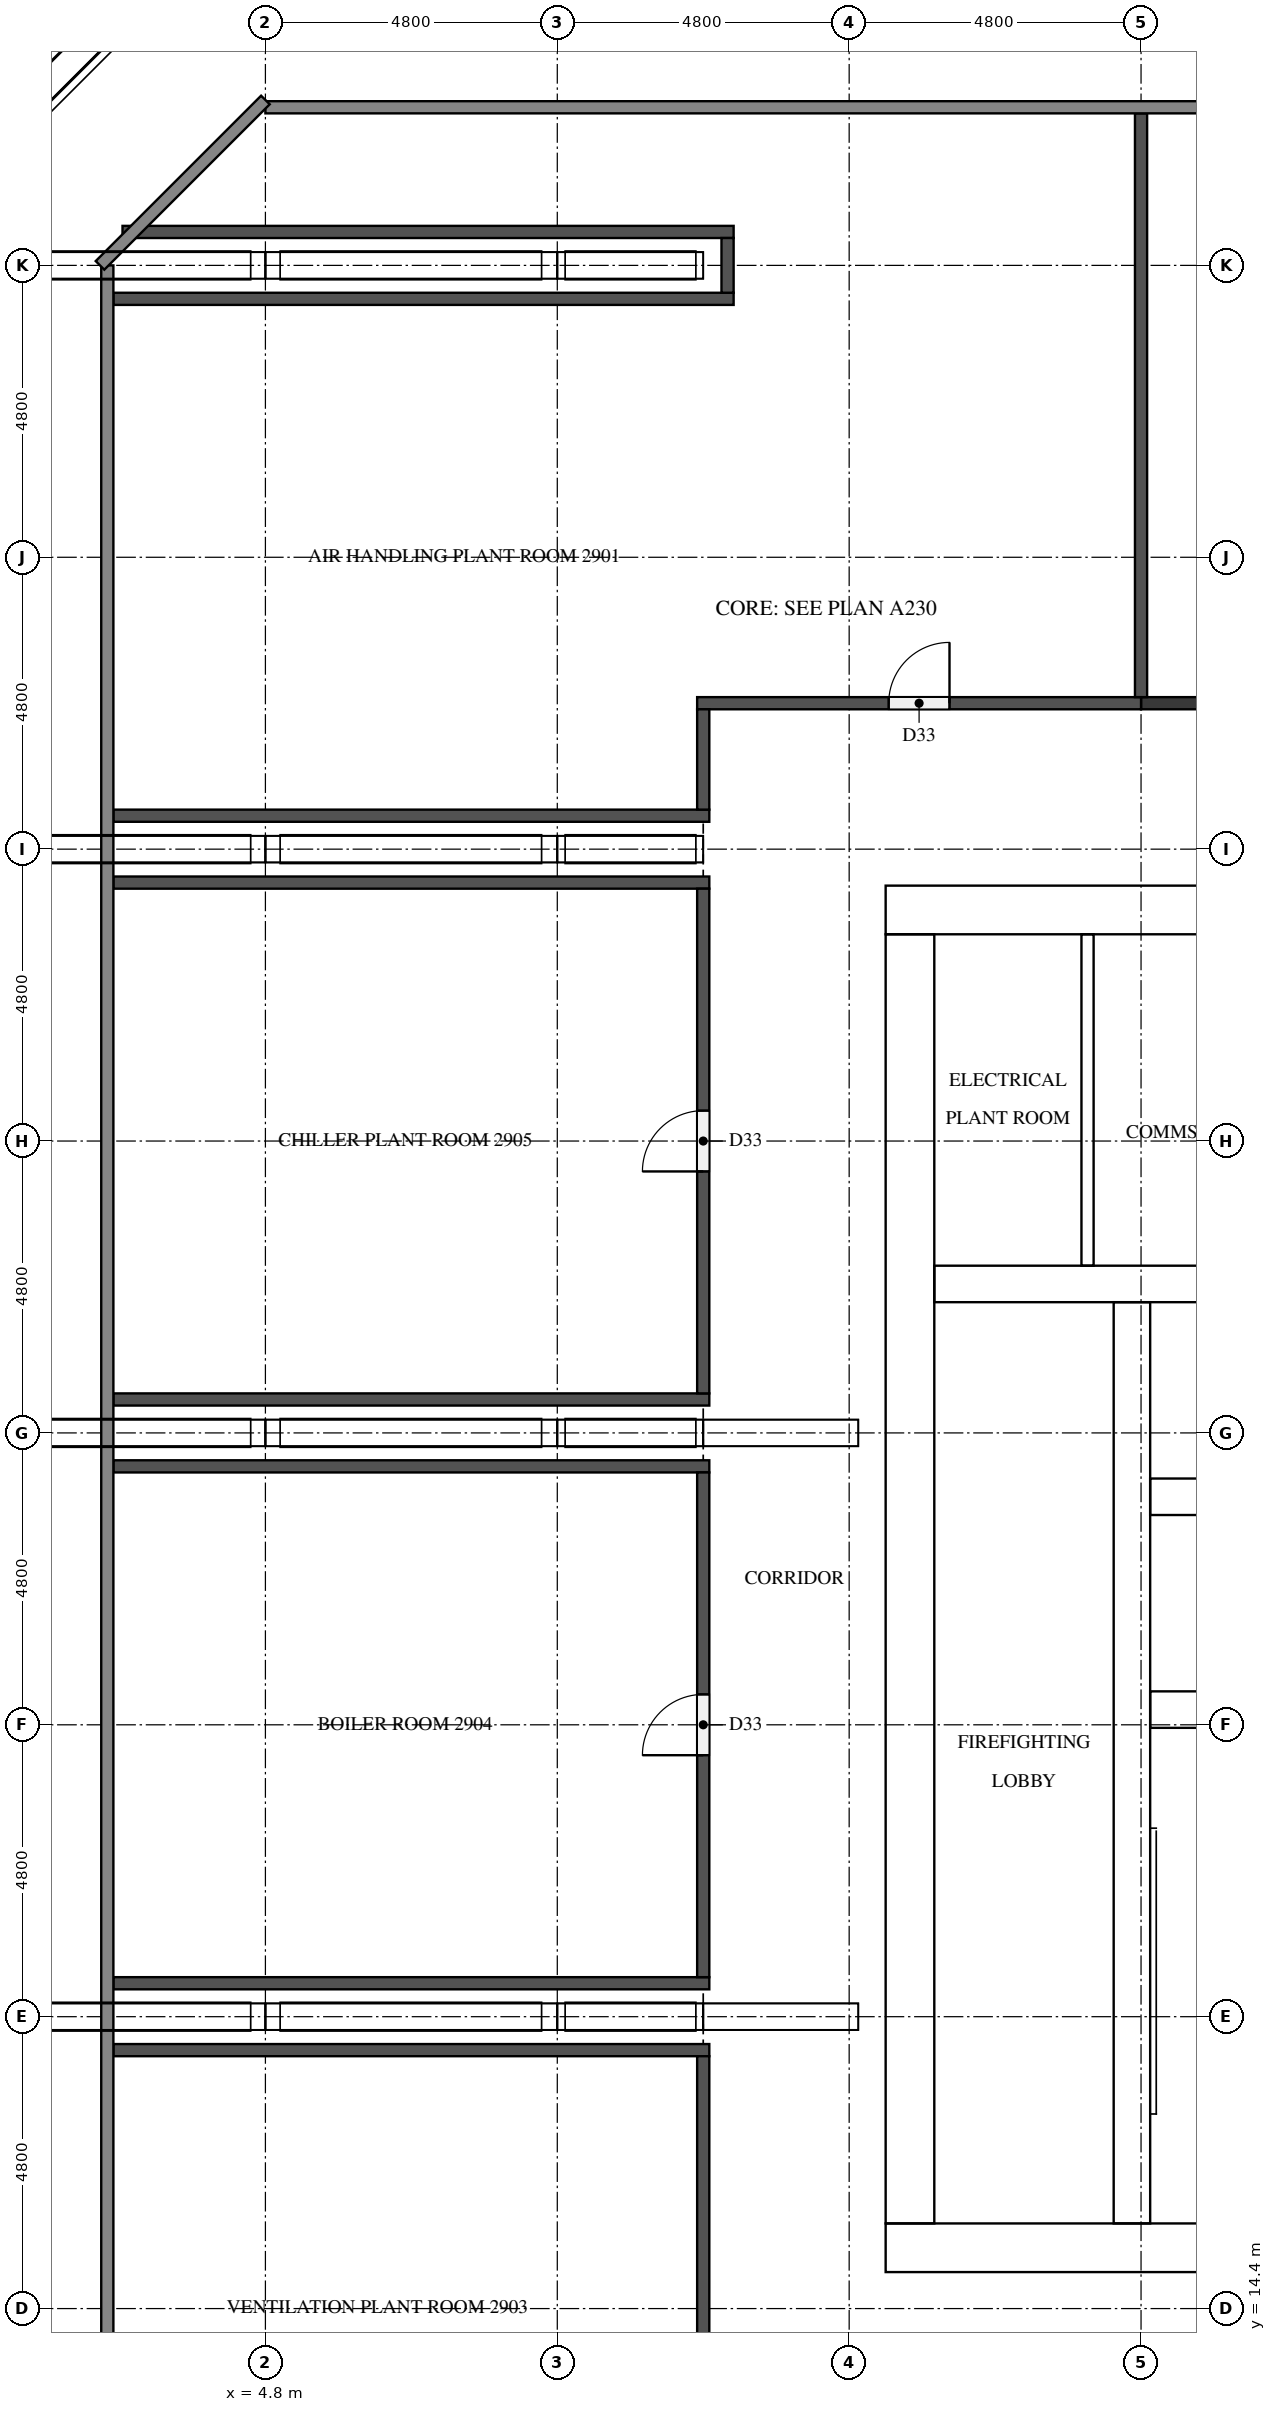
"""IFC4 building model, lengths in metres.
Left out: names, types, materials, properties, quantities, classifications, styles, units other than length and angle.
Written with IfcOpenShell. Run it as: python <this file> out.ifc"""

import sys

from ifc_helpers import new_model, si_unit, direction, frame, frame_2d, origin, place, context, subcontext, project, spatial, rectangle, extrude, element, fill, save


model = new_model("IFC4")
c1 = context("Model", 3, precision=1e-05, world=origin(), true_north=direction((0.0, 1.0)))
c2 = subcontext(c1, "Body", "Model", "MODEL_VIEW")
j1 = project(units=[si_unit("LENGTHUNIT", "METRE"), si_unit("PLANEANGLEUNIT", "RADIAN")], contexts=[c1])
p1 = place(None, origin())
s1 = spatial("IfcSite", under=j1, at=p1, CompositionType="ELEMENT")
p2 = place(p1, origin())
s2 = spatial("IfcBuilding", under=s1, at=p2, CompositionType="ELEMENT")
p3 = place(p2, frame((0.0, 0.0, 113.7)))
s3 = spatial("IfcBuildingStorey", under=s2, at=p3, CompositionType="ELEMENT", Elevation=113.7)
p4 = place(p3, frame((15.0, 15.4, 0.0), z_axis=(0.0, 0.0, 1.0), x_axis=(1.0, 0.0, 0.0)))
e1 = element("IfcWall", 1, at=p4, inside=s3, PredefinedType="SHEAR", context=c2, shape_type="SweptSolid", body=[
    extrude(rectangle(XDim=32.4, YDim=0.8, at=frame_2d((16.2, 0.0))), origin(), (0.0, 0.0, 1.0), 5.1),
])
p5 = place(p4, frame((15.3, 0.0, 0.0)))
e2 = element("IfcOpeningElement", 2, at=p5, cuts=e1, PredefinedType="OPENING", context=c2, shape_type="SweptSolid", body=[
    extrude(rectangle(XDim=1.8, YDim=2.1, at=frame_2d((0.9, 1.05))), frame((0.0, 0.41, 0.0), z_axis=(0.0, -1.0, 0.0), x_axis=(1.0, 0.0, 0.0)), (0.0, 0.0, 1.0), 0.82),
])
p6 = place(p3, frame((15.0, 37.4, 0.0), z_axis=(0.0, 0.0, 1.0), x_axis=(1.0, 0.0, 0.0)))
e3 = element("IfcWall", 3, at=p6, inside=s3, PredefinedType="SHEAR", context=c2, shape_type="SweptSolid", body=[
    extrude(rectangle(XDim=32.4, YDim=0.8, at=frame_2d((16.2, 0.0))), origin(), (0.0, 0.0, 1.0), 5.1),
])
p7 = place(p6, frame((15.3, 0.0, 0.0)))
e4 = element("IfcOpeningElement", 4, at=p7, cuts=e3, PredefinedType="OPENING", context=c2, shape_type="SweptSolid", body=[
    extrude(rectangle(XDim=1.8, YDim=2.1, at=frame_2d((0.9, 1.05))), frame((0.0, 0.41, 0.0), z_axis=(0.0, -1.0, 0.0), x_axis=(1.0, 0.0, 0.0)), (0.0, 0.0, 1.0), 0.82),
])
p8 = place(p6, frame((1.51, 0.0, 0.0)))
e5 = element("IfcOpeningElement", 5, at=p8, cuts=e3, PredefinedType="OPENING", context=c2, shape_type="SweptSolid", body=[
    extrude(rectangle(XDim=1.0, YDim=2.1, at=frame_2d((0.5, 1.05))), frame((0.0, 0.41, 0.0), z_axis=(0.0, -1.0, 0.0), x_axis=(1.0, 0.0, 0.0)), (0.0, 0.0, 1.0), 0.82),
])
p9 = place(p6, frame((5.11, 0.0, 0.0)))
e6 = element("IfcOpeningElement", 6, at=p9, cuts=e3, PredefinedType="OPENING", context=c2, shape_type="SweptSolid", body=[
    extrude(rectangle(XDim=1.0, YDim=2.1, at=frame_2d((0.5, 1.05))), frame((0.0, 0.41, 0.0), z_axis=(0.0, -1.0, 0.0), x_axis=(1.0, 0.0, 0.0)), (0.0, 0.0, 1.0), 0.82),
])
p10 = place(p3, frame((15.4, 15.8, 0.0), z_axis=(0.0, 0.0, 1.0), x_axis=(0.0, 1.0, 0.0)))
e7 = element("IfcWall", 7, at=p10, inside=s3, PredefinedType="SHEAR", context=c2, shape_type="SweptSolid", body=[
    extrude(rectangle(XDim=21.2, YDim=0.8, at=frame_2d((10.6, 0.0))), origin(), (0.0, 0.0, 1.0), 5.1),
])
p11 = place(p10, frame((4.96, 0.0, 0.0)))
e8 = element("IfcOpeningElement", 8, at=p11, cuts=e7, PredefinedType="OPENING", context=c2, shape_type="SweptSolid", body=[
    extrude(rectangle(XDim=1.2, YDim=2.1, at=frame_2d((0.6, 1.05))), frame((0.0, 0.41, 0.0), z_axis=(0.0, -1.0, 0.0), x_axis=(1.0, 0.0, 0.0)), (0.0, 0.0, 1.0), 0.82),
])
p12 = place(p3, frame((19.05, 15.8, 0.0), z_axis=(0.0, 0.0, 1.0), x_axis=(0.0, 1.0, 0.0)))
e9 = element("IfcWall", 9, at=p12, inside=s3, PredefinedType="SHEAR", context=c2, shape_type="SweptSolid", body=[
    extrude(rectangle(XDim=15.15, YDim=0.6, at=frame_2d((7.575, 0.0))), origin(), (0.0, 0.0, 1.0), 5.1),
])
p13 = place(p12, frame((9.65, 0.0, 0.0)))
e10 = element("IfcOpeningElement", 10, at=p13, cuts=e9, PredefinedType="OPENING", context=c2, shape_type="SweptSolid", body=[
    extrude(rectangle(XDim=1.1, YDim=2.1, at=frame_2d((0.55, 1.05))), frame((0.0, 0.31, 0.0), z_axis=(0.0, -1.0, 0.0), x_axis=(1.0, 0.0, 0.0)), (0.0, 0.0, 1.0), 0.62),
])
p14 = place(p12, frame((13.15, 0.0, 0.0)))
e11 = element("IfcOpeningElement", 11, at=p14, cuts=e9, PredefinedType="OPENING", context=c2, shape_type="SweptSolid", body=[
    extrude(rectangle(XDim=1.1, YDim=2.1, at=frame_2d((0.55, 1.05))), frame((0.0, 0.31, 0.0), z_axis=(0.0, -1.0, 0.0), x_axis=(1.0, 0.0, 0.0)), (0.0, 0.0, 1.0), 0.62),
])
p15 = place(p12, frame((0.4, 0.0, 0.0)))
e12 = element("IfcOpeningElement", 12, at=p15, cuts=e9, PredefinedType="OPENING", context=c2, shape_type="SweptSolid", body=[
    extrude(rectangle(XDim=1.2, YDim=2.1, at=frame_2d((0.6, 1.05))), frame((0.0, 0.31, 0.0), z_axis=(0.0, -1.0, 0.0), x_axis=(1.0, 0.0, 0.0)), (0.0, 0.0, 1.0), 0.62),
])
for number, where, z_axis, x_axis in (
    (13, (19.35, 24.25, 0.0), (0.0, 0.0, 1.0), (1.0, 0.0, 0.0)),
    (14, (19.35, 27.75, 0.0), (0.0, 0.0, 1.0), (1.0, 0.0, 0.0)),
):
    element("IfcWall", number, at=place(p3, frame(where, z_axis=z_axis, x_axis=x_axis)), inside=s3, PredefinedType="SHEAR", context=c2, shape_type="SweptSolid", body=[
        extrude(rectangle(XDim=3.45, YDim=0.6, at=frame_2d((1.725, 0.0))), origin(), (0.0, 0.0, 1.0), 5.1),
    ])
p16 = place(p3, frame((15.8, 31.25, 0.0), z_axis=(0.0, 0.0, 1.0), x_axis=(1.0, 0.0, 0.0)))
e15 = element("IfcWall", 15, at=p16, inside=s3, PredefinedType="SHEAR", context=c2, shape_type="SweptSolid", body=[
    extrude(rectangle(XDim=7.0, YDim=0.6, at=frame_2d((3.5, 0.0))), origin(), (0.0, 0.0, 1.0), 5.1),
])
p17 = place(p3, frame((18.32, 31.55, 0.0), z_axis=(0.0, 0.0, 1.0), x_axis=(0.0, 1.0, 0.0)))
e16 = element("IfcWall", 16, at=p17, inside=s3, PredefinedType="PARTITIONING", context=c2, shape_type="SweptSolid", body=[
    extrude(rectangle(XDim=5.45, YDim=0.2, at=frame_2d((2.725, 0.0))), origin(), (0.0, 0.0, 1.0), 5.1),
])
for number, where, z_axis, x_axis in (
    (17, (2.3, 18.65, 0.0), (0.0, 0.0, 1.0), (1.0, 0.0, 0.0)),
    (18, (2.3, 19.75, 0.0), (0.0, 0.0, 1.0), (1.0, 0.0, 0.0)),
    (19, (2.3, 28.25, 0.0), (0.0, 0.0, 1.0), (1.0, 0.0, 0.0)),
    (20, (2.3, 29.35, 0.0), (0.0, 0.0, 1.0), (1.0, 0.0, 0.0)),
    (21, (2.3, 37.85, 0.0), (0.0, 0.0, 1.0), (1.0, 0.0, 0.0)),
    (22, (2.3, 38.95, 0.0), (0.0, 0.0, 1.0), (1.0, 0.0, 0.0)),
):
    element("IfcWall", number, at=place(p3, frame(where, z_axis=z_axis, x_axis=x_axis)), inside=s3, PredefinedType="PARTITIONING", context=c2, shape_type="SweptSolid", body=[
        extrude(rectangle(XDim=9.8, YDim=0.2, at=frame_2d((4.9, 0.0))), origin(), (0.0, 0.0, 1.0), 5.1),
    ])
p18 = place(p3, frame((50.5, 40.8, 0.0), z_axis=(0.0, 0.0, 1.0), x_axis=(-1.0, 0.0, 0.0)))
e23 = element("IfcWall", 23, at=p18, inside=s3, PredefinedType="PARTITIONING", context=c2, shape_type="SweptSolid", body=[
    extrude(rectangle(XDim=31.3, YDim=0.2, at=frame_2d((15.65, 0.0))), origin(), (0.0, 0.0, 1.0), 5.1),
])
p19 = place(p18, frame((22.95, 0.0, 0.0)))
e24 = element("IfcOpeningElement", 24, at=p19, cuts=e23, PredefinedType="OPENING", context=c2, shape_type="SweptSolid", body=[
    extrude(rectangle(XDim=1.0, YDim=2.1, at=frame_2d((0.5, 1.05))), frame((0.0, 0.11, 0.0), z_axis=(0.0, -1.0, 0.0), x_axis=(1.0, 0.0, 0.0)), (0.0, 0.0, 1.0), 0.22),
])
p20 = place(p18, frame((7.35, 0.0, 0.0)))
e25 = element("IfcOpeningElement", 25, at=p20, cuts=e23, PredefinedType="OPENING", context=c2, shape_type="SweptSolid", body=[
    extrude(rectangle(XDim=1.0, YDim=2.1, at=frame_2d((0.5, 1.05))), frame((0.0, 0.11, 0.0), z_axis=(0.0, -1.0, 0.0), x_axis=(1.0, 0.0, 0.0)), (0.0, 0.0, 1.0), 0.22),
])
p21 = place(p3, frame((11.9, 40.8, 0.0), z_axis=(0.0, 0.0, 1.0), x_axis=(1.0, 0.0, 0.0)))
e26 = element("IfcWall", 26, at=p21, inside=s3, PredefinedType="PARTITIONING", context=c2, shape_type="SweptSolid", body=[
    extrude(rectangle(XDim=7.3, YDim=0.2, at=frame_2d((3.65, 0.0))), origin(), (0.0, 0.0, 1.0), 5.1),
])
p22 = place(p21, frame((3.15, 0.0, 0.0)))
e27 = element("IfcOpeningElement", 27, at=p22, cuts=e26, PredefinedType="OPENING", context=c2, shape_type="SweptSolid", body=[
    extrude(rectangle(XDim=1.0, YDim=2.1, at=frame_2d((0.5, 1.05))), frame((0.0, 0.11, 0.0), z_axis=(0.0, -1.0, 0.0), x_axis=(1.0, 0.0, 0.0)), (0.0, 0.0, 1.0), 0.22),
])
p23 = place(p3, frame((2.3, 47.45, 0.0), z_axis=(0.0, 0.0, 1.0), x_axis=(1.0, 0.0, 0.0)))
e28 = element("IfcWall", 28, at=p23, inside=s3, PredefinedType="PARTITIONING", context=c2, shape_type="SweptSolid", body=[
    extrude(rectangle(XDim=10.2, YDim=0.2, at=frame_2d((5.1, 0.0))), origin(), (0.0, 0.0, 1.0), 5.1),
])
p24 = place(p3, frame((2.45, 48.55, 0.0), z_axis=(0.0, 0.0, 1.0), x_axis=(1.0, 0.0, 0.0)))
e29 = element("IfcWall", 29, at=p24, inside=s3, PredefinedType="PARTITIONING", context=c2, shape_type="SweptSolid", body=[
    extrude(rectangle(XDim=10.05, YDim=0.2, at=frame_2d((5.025, 0.0))), origin(), (0.0, 0.0, 1.0), 5.1),
])
p25 = place(p3, frame((12.0, 12.1, 0.0), z_axis=(0.0, 0.0, 1.0), x_axis=(0.0, 1.0, 0.0)))
e30 = element("IfcWall", 30, at=p25, inside=s3, PredefinedType="PARTITIONING", context=c2, shape_type="SweptSolid", body=[
    extrude(rectangle(XDim=6.45, YDim=0.2, at=frame_2d((3.225, 0.0))), origin(), (0.0, 0.0, 1.0), 5.1),
])
p26 = place(p3, frame((12.0, 19.85, 0.0), z_axis=(0.0, 0.0, 1.0), x_axis=(0.0, 1.0, 0.0)))
e31 = element("IfcWall", 31, at=p26, inside=s3, PredefinedType="PARTITIONING", context=c2, shape_type="SweptSolid", body=[
    extrude(rectangle(XDim=8.3, YDim=0.2, at=frame_2d((4.15, 0.0))), origin(), (0.0, 0.0, 1.0), 5.1),
])
p27 = place(p26, frame((3.65, 0.0, 0.0)))
e32 = element("IfcOpeningElement", 32, at=p27, cuts=e31, PredefinedType="OPENING", context=c2, shape_type="SweptSolid", body=[
    extrude(rectangle(XDim=1.0, YDim=2.1, at=frame_2d((0.5, 1.05))), frame((0.0, 0.11, 0.0), z_axis=(0.0, -1.0, 0.0), x_axis=(1.0, 0.0, 0.0)), (0.0, 0.0, 1.0), 0.22),
])
p28 = place(p3, frame((12.0, 29.45, 0.0), z_axis=(0.0, 0.0, 1.0), x_axis=(0.0, 1.0, 0.0)))
e33 = element("IfcWall", 33, at=p28, inside=s3, PredefinedType="PARTITIONING", context=c2, shape_type="SweptSolid", body=[
    extrude(rectangle(XDim=8.3, YDim=0.2, at=frame_2d((4.15, 0.0))), origin(), (0.0, 0.0, 1.0), 5.1),
])
p29 = place(p28, frame((3.65, 0.0, 0.0)))
e34 = element("IfcOpeningElement", 34, at=p29, cuts=e33, PredefinedType="OPENING", context=c2, shape_type="SweptSolid", body=[
    extrude(rectangle(XDim=1.0, YDim=2.1, at=frame_2d((0.5, 1.05))), frame((0.0, 0.11, 0.0), z_axis=(0.0, -1.0, 0.0), x_axis=(1.0, 0.0, 0.0)), (0.0, 0.0, 1.0), 0.22),
])
p30 = place(p3, frame((12.0, 39.05, 0.0), z_axis=(0.0, 0.0, 1.0), x_axis=(0.0, 1.0, 0.0)))
e35 = element("IfcWall", 35, at=p30, inside=s3, PredefinedType="PARTITIONING", context=c2, shape_type="SweptSolid", body=[
    extrude(rectangle(XDim=1.65, YDim=0.2, at=frame_2d((0.825, 0.0))), origin(), (0.0, 0.0, 1.0), 5.1),
])
p31 = place(p3, frame((12.4, 47.55, 0.0), z_axis=(0.0, 0.0, 1.0), x_axis=(0.0, 1.0, 0.0)))
e36 = element("IfcWall", 36, at=p31, inside=s3, PredefinedType="PARTITIONING", context=c2, shape_type="SweptSolid", body=[
    extrude(rectangle(XDim=0.9, YDim=0.2, at=frame_2d((0.45, 0.0))), origin(), (0.0, 0.0, 1.0), 5.1),
])
p32 = place(p3, frame((19.2, 40.9, 0.0), z_axis=(0.0, 0.0, 1.0), x_axis=(0.0, 1.0, 0.0)))
e37 = element("IfcWall", 37, at=p32, inside=s3, PredefinedType="PARTITIONING", context=c2, shape_type="SweptSolid", body=[
    extrude(rectangle(XDim=9.6, YDim=0.2, at=frame_2d((4.8, 0.0))), origin(), (0.0, 0.0, 1.0), 5.1),
])
p33 = place(p13, origin())
e38 = element("IfcDoor", 38, at=p33, inside=s3, OperationType="DOUBLE_DOOR_SLIDING", PredefinedType="DOOR", context=c2, shape_type="SweptSolid", body=[
    extrude(rectangle(XDim=1.1, YDim=2.1, at=frame_2d((0.55, 1.05))), frame((0.0, 0.025, 0.0), z_axis=(0.0, -1.0, 0.0), x_axis=(1.0, 0.0, 0.0)), (0.0, 0.0, 1.0), 0.05),
])
fill(e10, e38)
p34 = place(p14, origin())
e39 = element("IfcDoor", 39, at=p34, inside=s3, OperationType="DOUBLE_DOOR_SLIDING", PredefinedType="DOOR", context=c2, shape_type="SweptSolid", body=[
    extrude(rectangle(XDim=1.1, YDim=2.1, at=frame_2d((0.55, 1.05))), frame((0.0, 0.025, 0.0), z_axis=(0.0, -1.0, 0.0), x_axis=(1.0, 0.0, 0.0)), (0.0, 0.0, 1.0), 0.05),
])
fill(e11, e39)
p35 = place(p15, frame((1.2, 0.0, 0.0), z_axis=(0.0, 0.0, 1.0), x_axis=(-1.0, 0.0, 0.0)))
e40 = element("IfcDoor", 40, at=p35, inside=s3, OperationType="SINGLE_SWING_LEFT", PredefinedType="DOOR", context=c2, shape_type="SweptSolid", body=[
    extrude(rectangle(XDim=1.2, YDim=2.1, at=frame_2d((0.6, 1.05))), frame((0.0, 0.025, 0.0), z_axis=(0.0, -1.0, 0.0), x_axis=(1.0, 0.0, 0.0)), (0.0, 0.0, 1.0), 0.05),
])
fill(e12, e40)
p36 = place(p11, frame((1.2, 0.0, 0.0), z_axis=(0.0, 0.0, 1.0), x_axis=(-1.0, 0.0, 0.0)))
e41 = element("IfcDoor", 41, at=p36, inside=s3, OperationType="SINGLE_SWING_RIGHT", PredefinedType="DOOR", context=c2, shape_type="SweptSolid", body=[
    extrude(rectangle(XDim=1.2, YDim=2.1, at=frame_2d((0.6, 1.05))), frame((0.0, 0.025, 0.0), z_axis=(0.0, -1.0, 0.0), x_axis=(1.0, 0.0, 0.0)), (0.0, 0.0, 1.0), 0.05),
])
fill(e8, e41)
p37 = place(p8, origin())
e42 = element("IfcDoor", 42, at=p37, inside=s3, OperationType="SINGLE_SWING_RIGHT", PredefinedType="DOOR", context=c2, shape_type="SweptSolid", body=[
    extrude(rectangle(XDim=1.0, YDim=2.1, at=frame_2d((0.5, 1.05))), frame((0.0, 0.025, 0.0), z_axis=(0.0, -1.0, 0.0), x_axis=(1.0, 0.0, 0.0)), (0.0, 0.0, 1.0), 0.05),
])
fill(e5, e42)
p38 = place(p22, origin())
e43 = element("IfcDoor", 43, at=p38, inside=s3, OperationType="SINGLE_SWING_RIGHT", PredefinedType="DOOR", context=c2, shape_type="SweptSolid", body=[
    extrude(rectangle(XDim=1.0, YDim=2.1, at=frame_2d((0.5, 1.05))), frame((0.0, 0.025, 0.0), z_axis=(0.0, -1.0, 0.0), x_axis=(1.0, 0.0, 0.0)), (0.0, 0.0, 1.0), 0.05),
])
fill(e27, e43)
p39 = place(p27, origin())
e44 = element("IfcDoor", 44, at=p39, inside=s3, OperationType="SINGLE_SWING_LEFT", PredefinedType="DOOR", context=c2, shape_type="SweptSolid", body=[
    extrude(rectangle(XDim=1.0, YDim=2.1, at=frame_2d((0.5, 1.05))), frame((0.0, 0.025, 0.0), z_axis=(0.0, -1.0, 0.0), x_axis=(1.0, 0.0, 0.0)), (0.0, 0.0, 1.0), 0.05),
])
fill(e32, e44)
p40 = place(p29, origin())
e45 = element("IfcDoor", 45, at=p40, inside=s3, OperationType="SINGLE_SWING_LEFT", PredefinedType="DOOR", context=c2, shape_type="SweptSolid", body=[
    extrude(rectangle(XDim=1.0, YDim=2.1, at=frame_2d((0.5, 1.05))), frame((0.0, 0.025, 0.0), z_axis=(0.0, -1.0, 0.0), x_axis=(1.0, 0.0, 0.0)), (0.0, 0.0, 1.0), 0.05),
])
fill(e34, e45)
save(model, sys.argv[1])
